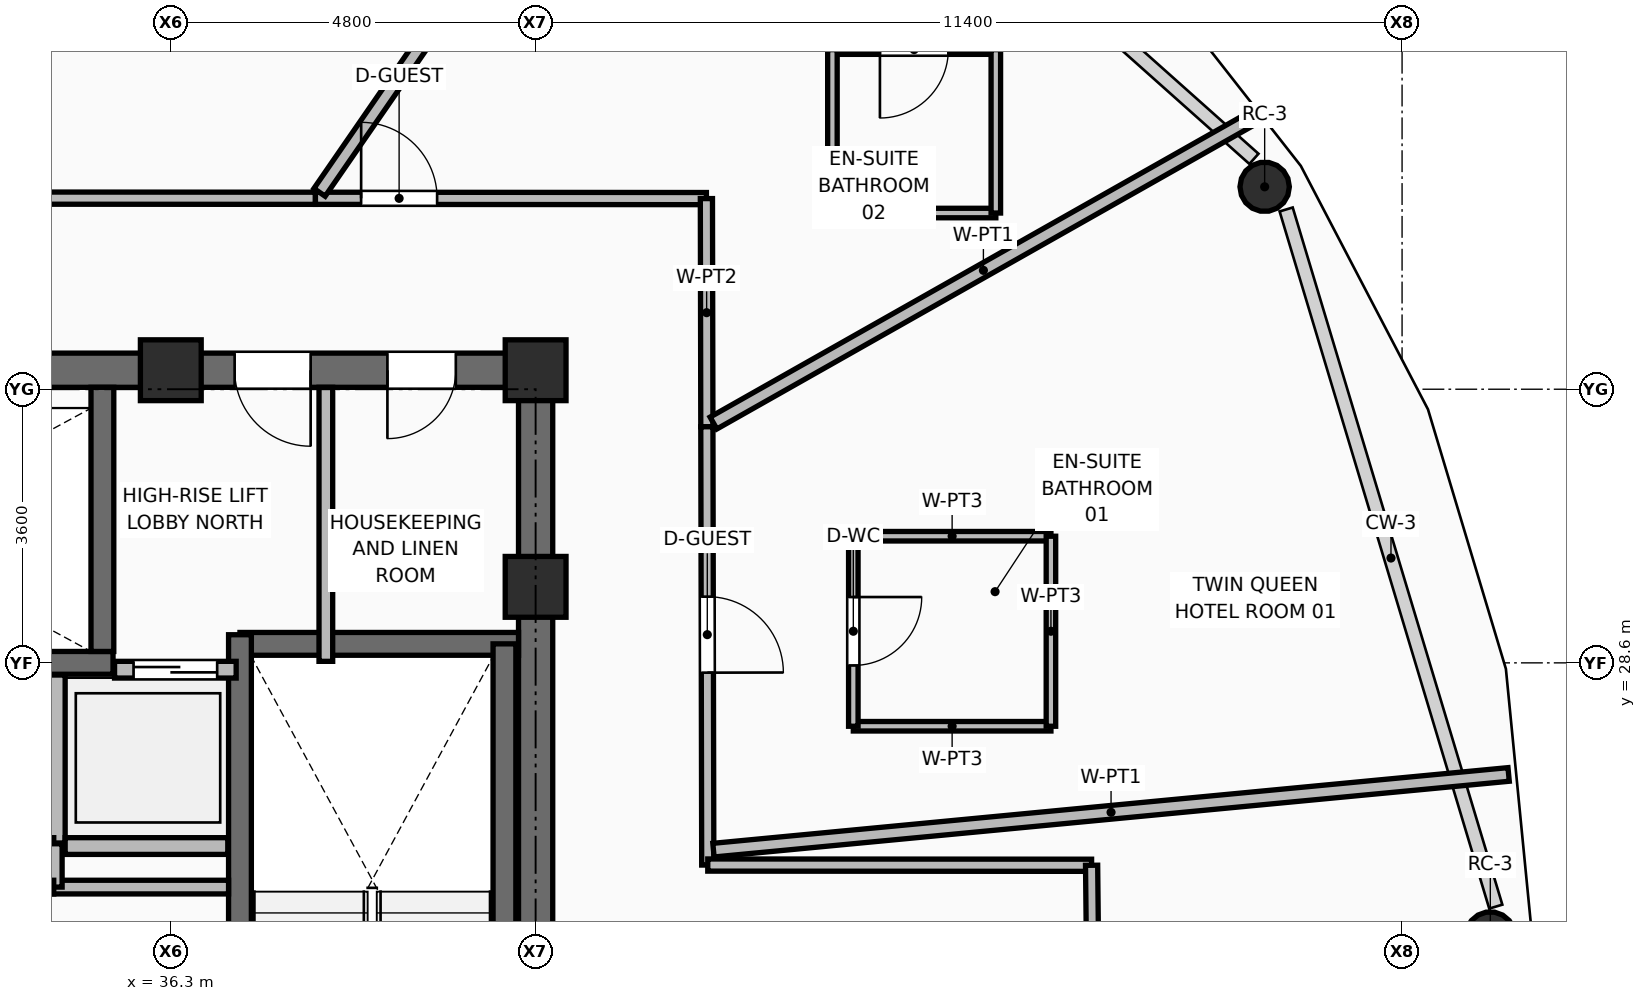
"""IFC4 building model, lengths in metres.
Left out: names, types, materials, properties, quantities, classifications, styles, units other than length and angle.
Written with IfcOpenShell. Run it as: python <this file> out.ifc"""

import sys

from ifc_helpers import new_model, si_unit, direction, frame, frame_2d, origin, origin_2d, place, context, subcontext, project, spatial, rectangle, hollow_circle, extrude, element, fill, save


model = new_model("IFC4")
c1 = context("Model", 3, precision=1e-05, world=origin(), true_north=direction((0.0, 1.0)))
c2 = subcontext(c1, "Body", "Model", "MODEL_VIEW")
j1 = project(units=[si_unit("LENGTHUNIT", "METRE"), si_unit("PLANEANGLEUNIT", "RADIAN")], contexts=[c1])
p1 = place(None, origin())
s1 = spatial("IfcSite", under=j1, at=p1, CompositionType="ELEMENT")
p2 = place(p1, origin())
s2 = spatial("IfcBuilding", under=s1, at=p2, CompositionType="ELEMENT")
p3 = place(p2, frame((0.0, 0.0, 212.4)))
s3 = spatial("IfcBuildingStorey", under=s2, at=p3, CompositionType="ELEMENT", Elevation=212.4)
for number, where, z_axis, x_axis in (
    (1, (41.1, 29.6, 0.0), (0.0, 0.0, 1.0), (1.0, 0.0, 0.0)),
    (2, (36.3, 32.45, 0.0), (0.0, 0.0, 1.0), (1.0, 0.0, 0.0)),
    (3, (41.1, 32.45, 0.0), (0.0, 0.0, 1.0), (1.0, 0.0, 0.0)),
):
    element("IfcColumn", number, at=place(p3, frame(where, z_axis=z_axis, x_axis=x_axis)), inside=s3, PredefinedType="COLUMN", context=c2, shape_type="SweptSolid", body=[
        extrude(rectangle(XDim=0.8, YDim=0.8, at=origin_2d()), origin(), (0.0, 0.0, 1.0), 3.75),
    ])
for number, where, z_axis, x_axis in (
    (4, (53.661, 25.0, 0.0), (-0.021, 0.0, 1.0), (0.0, -1.0, 0.0)),
    (5, (50.692, 34.863, 0.0), (-0.018, -0.009, 1.0), (0.458, -0.889, 0.0)),
):
    element("IfcColumn", number, at=place(p3, frame(where, z_axis=z_axis, x_axis=x_axis)), inside=s3, PredefinedType="COLUMN", context=c2, shape_type="SweptSolid", body=[
        extrude(hollow_circle(Radius=0.325, WallThickness=0.03, at=origin_2d()), origin(), (0.0, 0.0, 1.0), 3.571),
    ])
p4 = place(p3, frame((34.8, 26.23, 0.0), z_axis=(0.0, 0.0, 1.0), x_axis=(0.0, 1.0, 0.0)))
e6 = element("IfcWall", 6, at=p4, inside=s3, PredefinedType="PARTITIONING", context=c2, shape_type="SweptSolid", body=[
    extrude(rectangle(XDim=2.21, YDim=0.22, at=frame_2d((1.105, 0.0))), origin(), (0.0, 0.0, 1.0), 3.545),
])
p5 = place(p3, frame((34.91, 26.19, 0.0), z_axis=(0.0, 0.0, 1.0), x_axis=(1.0, 0.0, 0.0)))
e7 = element("IfcWall", 7, at=p5, inside=s3, PredefinedType="PARTITIONING", context=c2, shape_type="SweptSolid", body=[
    extrude(rectangle(XDim=2.14, YDim=0.22, at=frame_2d((1.07, 0.0))), origin(), (0.0, 0.0, 1.0), 3.545),
])
p6 = place(p3, frame((21.675, 32.45, 0.0), z_axis=(0.0, 0.0, 1.0), x_axis=(1.0, 0.0, 0.0)))
e8 = element("IfcWall", 8, at=p6, inside=s3, PredefinedType="SHEAR", context=c2, shape_type="SweptSolid", body=[
    extrude(rectangle(XDim=19.65, YDim=0.45, at=frame_2d((9.825, 0.0))), origin(), (0.0, 0.0, 1.0), 3.57),
])
p7 = place(p6, frame((2.075, 0.0, 0.0)))
e9 = element("IfcOpeningElement", 9, at=p7, cuts=e8, PredefinedType="OPENING", context=c2, shape_type="SweptSolid", body=[
    extrude(rectangle(XDim=1.1, YDim=2.1, at=frame_2d((0.55, 1.05))), frame((0.0, 0.235, 0.0), z_axis=(0.0, -1.0, 0.0), x_axis=(1.0, 0.0, 0.0)), (0.0, 0.0, 1.0), 0.47),
])
p8 = place(p6, frame((15.465, 0.0, 0.0)))
e10 = element("IfcOpeningElement", 10, at=p8, cuts=e8, PredefinedType="OPENING", context=c2, shape_type="SweptSolid", body=[
    extrude(rectangle(XDim=1.0, YDim=2.1, at=frame_2d((0.5, 1.05))), frame((0.0, 0.235, 0.0), z_axis=(0.0, -1.0, 0.0), x_axis=(1.0, 0.0, 0.0)), (0.0, 0.0, 1.0), 0.47),
])
p9 = place(p6, frame((17.475, 0.0, 0.0)))
e11 = element("IfcOpeningElement", 11, at=p9, cuts=e8, PredefinedType="OPENING", context=c2, shape_type="SweptSolid", body=[
    extrude(rectangle(XDim=0.9, YDim=2.1, at=frame_2d((0.45, 1.05))), frame((0.0, 0.235, 0.0), z_axis=(0.0, -1.0, 0.0), x_axis=(1.0, 0.0, 0.0)), (0.0, 0.0, 1.0), 0.47),
])
p10 = place(p3, frame((41.1, 18.025, 0.0), z_axis=(0.0, 0.0, 1.0), x_axis=(0.0, 1.0, 0.0)))
e12 = element("IfcWall", 12, at=p10, inside=s3, PredefinedType="SHEAR", context=c2, shape_type="SweptSolid", body=[
    extrude(rectangle(XDim=14.2, YDim=0.45, at=frame_2d((7.1, 0.0))), origin(), (0.0, 0.0, 1.0), 3.57),
])
p11 = place(p10, frame((3.435, 0.0, 0.0)))
e13 = element("IfcOpeningElement", 13, at=p11, cuts=e12, PredefinedType="OPENING", context=c2, shape_type="SweptSolid", body=[
    extrude(rectangle(XDim=1.05, YDim=2.1, at=frame_2d((0.525, 1.05))), frame((0.0, 0.235, 0.0), z_axis=(0.0, -1.0, 0.0), x_axis=(1.0, 0.0, 0.0)), (0.0, 0.0, 1.0), 0.47),
])
p12 = place(p3, frame((37.21, 28.85, 0.0), z_axis=(0.0, 0.0, 1.0), x_axis=(1.0, 0.0, 0.0)))
e14 = element("IfcWall", 14, at=p12, inside=s3, PredefinedType="SHEAR", context=c2, shape_type="SweptSolid", body=[
    extrude(rectangle(XDim=3.665, YDim=0.3, at=frame_2d((1.833, 0.0))), origin(), (0.0, 0.0, 1.0), 3.57),
])
p13 = place(p3, frame((37.21, 20.98, 0.0), z_axis=(0.0, 0.0, 1.0), x_axis=(0.0, 1.0, 0.0)))
e15 = element("IfcWall", 15, at=p13, inside=s3, PredefinedType="SHEAR", context=c2, shape_type="SweptSolid", body=[
    extrude(rectangle(XDim=7.99, YDim=0.3, at=frame_2d((3.995, 0.0))), origin(), (0.0, 0.0, 1.0), 3.57),
])
p14 = place(p3, frame((40.69, 22.65, 0.0), z_axis=(0.0, 0.0, 1.0), x_axis=(0.0, 1.0, 0.0)))
e16 = element("IfcWall", 16, at=p14, inside=s3, PredefinedType="SHEAR", context=c2, shape_type="SweptSolid", body=[
    extrude(rectangle(XDim=6.2, YDim=0.3, at=frame_2d((3.1, 0.0))), origin(), (0.0, 0.0, 1.0), 3.57),
])
p15 = place(p3, frame((27.51, 28.6, 0.0), z_axis=(0.0, 0.0, 1.0), x_axis=(1.0, 0.0, 0.0)))
e17 = element("IfcWall", 17, at=p15, inside=s3, PredefinedType="SHEAR", context=c2, shape_type="SweptSolid", body=[
    extrude(rectangle(XDim=8.03, YDim=0.3, at=frame_2d((4.015, 0.0))), origin(), (0.0, 0.0, 1.0), 3.57),
])
p16 = place(p3, frame((35.4, 28.75, 0.0), z_axis=(0.0, 0.0, 1.0), x_axis=(0.0, 1.0, 0.0)))
e18 = element("IfcWall", 18, at=p16, inside=s3, PredefinedType="SHEAR", context=c2, shape_type="SweptSolid", body=[
    extrude(rectangle(XDim=3.475, YDim=0.3, at=frame_2d((1.738, 0.0))), origin(), (0.0, 0.0, 1.0), 3.57),
])
p17 = place(p3, frame((32.44, 26.19, 0.0), z_axis=(0.0, 0.0, 1.0), x_axis=(1.0, 0.0, 0.0)))
e19 = element("IfcWall", 19, at=p17, inside=s3, PredefinedType="PARTITIONING", context=c2, shape_type="SweptSolid", body=[
    extrude(rectangle(XDim=2.32, YDim=0.22, at=frame_2d((1.16, 0.0))), origin(), (0.0, 0.0, 1.0), 3.55),
])
p18 = place(p17, frame((0.61, 0.0, 0.0)))
e20 = element("IfcOpeningElement", 20, at=p18, cuts=e19, PredefinedType="OPENING", context=c2, shape_type="SweptSolid", body=[
    extrude(rectangle(XDim=1.1, YDim=2.2, at=frame_2d((0.55, 1.1))), frame((0.0, 0.12, 0.0), z_axis=(0.0, -1.0, 0.0), x_axis=(1.0, 0.0, 0.0)), (0.0, 0.0, 1.0), 0.24),
])
p19 = place(p3, frame((35.56, 28.51, 0.0), z_axis=(0.0, 0.0, 1.0), x_axis=(1.0, 0.0, 0.0)))
e21 = element("IfcWall", 21, at=p19, inside=s3, PredefinedType="PARTITIONING", context=c2, shape_type="SweptSolid", body=[
    extrude(rectangle(XDim=1.6, YDim=0.22, at=frame_2d((0.8, 0.0))), origin(), (0.0, 0.0, 1.0), 3.55),
])
p20 = place(p19, frame((0.25, 0.0, 0.0)))
e22 = element("IfcOpeningElement", 22, at=p20, cuts=e21, PredefinedType="OPENING", context=c2, shape_type="SweptSolid", body=[
    extrude(rectangle(XDim=1.1, YDim=2.2, at=frame_2d((0.55, 1.1))), frame((0.0, 0.12, 0.0), z_axis=(0.0, -1.0, 0.0), x_axis=(1.0, 0.0, 0.0)), (0.0, 0.0, 1.0), 0.24),
])
p21 = place(p3, frame((34.72, 25.65, 0.0), z_axis=(0.0, 0.0, 1.0), x_axis=(1.0, 0.0, 0.0)))
e23 = element("IfcWall", 23, at=p21, inside=s3, PredefinedType="PARTITIONING", context=c2, shape_type="SweptSolid", body=[
    extrude(rectangle(XDim=2.34, YDim=0.18, at=frame_2d((1.17, 0.0))), origin(), (0.0, 0.0, 1.0), 3.55),
])
p22 = place(p3, frame((34.76, 25.65, 0.0), z_axis=(0.0, 0.0, 1.0), x_axis=(0.0, 1.0, 0.0)))
e24 = element("IfcWall", 24, at=p22, inside=s3, PredefinedType="PARTITIONING", context=c2, shape_type="SweptSolid", body=[
    extrude(rectangle(XDim=0.57, YDim=0.22, at=frame_2d((0.285, 0.0))), origin(), (0.0, 0.0, 1.0), 3.55),
])
p23 = place(p3, frame((33.08, 25.65, 0.0), z_axis=(0.0, 0.0, 1.0), x_axis=(1.0, 0.0, 0.0)))
e25 = element("IfcWall", 25, at=p23, inside=s3, PredefinedType="PARTITIONING", context=c2, shape_type="SweptSolid", body=[
    extrude(rectangle(XDim=1.68, YDim=0.18, at=frame_2d((0.84, 0.0))), origin(), (0.0, 0.0, 1.0), 3.55),
])
p24 = place(p3, frame((38.34, 28.62, 0.0), z_axis=(0.0, 0.0, 1.0), x_axis=(0.0, 1.0, 0.0)))
e26 = element("IfcWall", 26, at=p24, inside=s3, PredefinedType="PARTITIONING", context=c2, shape_type="SweptSolid", body=[
    extrude(rectangle(XDim=3.605, YDim=0.18, at=frame_2d((1.802, 0.0))), origin(), (0.0, 0.0, 1.0), 3.55),
])
p25 = place(p3, frame((32.74, 34.715, 0.0), z_axis=(0.0, 0.0, 1.0), x_axis=(0.999999831231, -0.000580979523, 0.0)))
e27 = element("IfcWall", 27, at=p25, inside=s3, PredefinedType="PARTITIONING", context=c2, shape_type="SweptSolid", body=[
    extrude(rectangle(XDim=5.463, YDim=0.16, at=frame_2d((2.731, 0.0))), origin(), (0.0, 0.0, 1.0), 3.55),
])
p26 = place(p25, frame((0.16, 0.0, 0.0)))
e28 = element("IfcOpeningElement", 28, at=p26, cuts=e27, PredefinedType="OPENING", context=c2, shape_type="SweptSolid", body=[
    extrude(rectangle(XDim=1.0, YDim=2.1, at=frame_2d((0.5, 1.05))), frame((0.0, 0.09, 0.0), z_axis=(0.0, -1.0, 0.0), x_axis=(1.0, 0.0, 0.0)), (0.0, 0.0, 1.0), 0.18),
])
p27 = place(p3, frame((38.203, 34.712, 0.0), z_axis=(0.0, 0.0, 1.0), x_axis=(0.999999711676, -0.000759373298, 0.0)))
e29 = element("IfcWall", 29, at=p27, inside=s3, PredefinedType="PARTITIONING", context=c2, shape_type="SweptSolid", body=[
    extrude(rectangle(XDim=5.144, YDim=0.16, at=frame_2d((2.572, 0.0))), origin(), (0.0, 0.0, 1.0), 3.081),
])
p28 = place(p27, frame((0.601, 0.0, 0.0)))
e30 = element("IfcOpeningElement", 30, at=p28, cuts=e29, PredefinedType="OPENING", context=c2, shape_type="SweptSolid", body=[
    extrude(rectangle(XDim=1.0, YDim=2.1, at=frame_2d((0.5, 1.05))), frame((0.0, 0.09, 0.0), z_axis=(0.0, -1.0, 0.0), x_axis=(1.0, 0.0, 0.0)), (0.0, 0.0, 1.0), 0.18),
])
p29 = place(p3, frame((43.347, 34.708, 0.0), z_axis=(0.0, 0.0, 1.0), x_axis=(0.00203317732, -0.999997933093, 0.0)))
e31 = element("IfcWall", 31, at=p29, inside=s3, PredefinedType="PARTITIONING", context=c2, shape_type="SweptSolid", body=[
    extrude(rectangle(XDim=3.002, YDim=0.16, at=frame_2d((1.501, 0.0))), origin(), (0.0, 0.0, 1.0), 3.081),
])
p30 = place(p3, frame((43.353, 31.706, 0.0), z_axis=(0.0, 0.0, 1.0), x_axis=(0.002074684332, -0.99999784784, 0.0)))
e32 = element("IfcWall", 32, at=p30, inside=s3, PredefinedType="PARTITIONING", context=c2, shape_type="SweptSolid", body=[
    extrude(rectangle(XDim=5.766, YDim=0.16, at=frame_2d((2.883, 0.0))), origin(), (0.0, 0.0, 1.0), 3.55),
])
p31 = place(p30, frame((2.235, 0.0, 0.0)))
e33 = element("IfcOpeningElement", 33, at=p31, cuts=e32, PredefinedType="OPENING", context=c2, shape_type="SweptSolid", body=[
    extrude(rectangle(XDim=1.0, YDim=2.1, at=frame_2d((0.5, 1.05))), frame((0.0, 0.09, 0.0), z_axis=(0.0, -1.0, 0.0), x_axis=(1.0, 0.0, 0.0)), (0.0, 0.0, 1.0), 0.18),
])
p32 = place(p3, frame((43.365, 25.94, 0.0), z_axis=(0.0, 0.0, 1.0), x_axis=(0.999999831724, -0.000580130432, 0.0)))
e34 = element("IfcWall", 34, at=p32, inside=s3, PredefinedType="PARTITIONING", context=c2, shape_type="SweptSolid", body=[
    extrude(rectangle(XDim=5.05, YDim=0.16, at=frame_2d((2.525, 0.0))), origin(), (0.0, 0.0, 1.0), 3.55),
])
p33 = place(p3, frame((48.415, 25.937, 0.0), z_axis=(0.0, 0.0, 1.0), x_axis=(0.010636586698, -0.999943429912, 0.0)))
e35 = element("IfcWall", 35, at=p33, inside=s3, PredefinedType="PARTITIONING", context=c2, shape_type="SweptSolid", body=[
    extrude(rectangle(XDim=2.341, YDim=0.16, at=frame_2d((1.171, 0.0))), origin(), (0.0, 0.0, 1.0), 3.55),
])
p34 = place(p3, frame((43.44, 26.136, 0.0), z_axis=(0.0, 0.0, 1.0), x_axis=(0.995498186765, 0.094780589504, 0.0)))
e36 = element("IfcWall", 36, at=p34, inside=s3, PredefinedType="PARTITIONING", context=c2, shape_type="SweptSolid", body=[
    extrude(rectangle(XDim=10.51, YDim=0.18, at=frame_2d((5.255, 0.0))), origin(), (0.0, 0.0, 1.0), 2.925),
])
p35 = place(p3, frame((43.44, 31.755, 0.0), z_axis=(0.0, 0.0, 1.0), x_axis=(0.870388943292, 0.492364790978, 0.0)))
e37 = element("IfcWall", 37, at=p35, inside=s3, PredefinedType="PARTITIONING", context=c2, shape_type="SweptSolid", body=[
    extrude(rectangle(XDim=8.161, YDim=0.18, at=frame_2d((4.08, 0.0))), origin(), (0.0, 0.0, 1.0), 2.925),
])
p36 = place(p3, frame((38.257, 34.79, 0.0), z_axis=(0.0, 0.0, 1.0), x_axis=(0.568051508393, 0.822993003502, 0.0)))
e38 = element("IfcWall", 38, at=p36, inside=s3, PredefinedType="PARTITIONING", context=c2, shape_type="SweptSolid", body=[
    extrude(rectangle(XDim=8.936, YDim=0.18, at=frame_2d((4.468, 0.0))), origin(), (0.0, 0.0, 1.0), 2.925),
])
for number, where, z_axis, x_axis in (
    (39, (45.28, 27.766, 0.0), (0.0, 0.0, 1.0), (1.0, 0.0, 0.0)),
    (40, (45.28, 30.266, 0.0), (0.0, 0.0, 1.0), (1.0, 0.0, 0.0)),
):
    element("IfcWall", number, at=place(p3, frame(where, z_axis=z_axis, x_axis=x_axis)), inside=s3, PredefinedType="PARTITIONING", context=c2, shape_type="SweptSolid", body=[
        extrude(rectangle(XDim=2.6, YDim=0.125, at=frame_2d((1.3, 0.0))), origin(), (0.0, 0.0, 1.0), 3.55),
    ])
p37 = place(p3, frame((45.28, 27.766, 0.0), z_axis=(0.0, 0.0, 1.0), x_axis=(0.0, 1.0, 0.0)))
e41 = element("IfcWall", 41, at=p37, inside=s3, PredefinedType="PARTITIONING", context=c2, shape_type="SweptSolid", body=[
    extrude(rectangle(XDim=2.5, YDim=0.125, at=frame_2d((1.25, 0.0))), origin(), (0.0, 0.0, 1.0), 3.55),
])
p38 = place(p37, frame((0.8, 0.0, 0.0)))
e42 = element("IfcOpeningElement", 42, at=p38, cuts=e41, PredefinedType="OPENING", context=c2, shape_type="SweptSolid", body=[
    extrude(rectangle(XDim=0.9, YDim=2.1, at=frame_2d((0.45, 1.05))), frame((0.0, 0.073, 0.0), z_axis=(0.0, -1.0, 0.0), x_axis=(1.0, 0.0, 0.0)), (0.0, 0.0, 1.0), 0.145),
])
p39 = place(p3, frame((47.88, 27.766, 0.0), z_axis=(0.0, 0.0, 1.0), x_axis=(0.0, 1.0, 0.0)))
e43 = element("IfcWall", 43, at=p39, inside=s3, PredefinedType="PARTITIONING", context=c2, shape_type="SweptSolid", body=[
    extrude(rectangle(XDim=2.5, YDim=0.125, at=frame_2d((1.25, 0.0))), origin(), (0.0, 0.0, 1.0), 3.55),
])
p40 = place(p3, frame((45.005, 34.518, 0.0), z_axis=(0.0, 0.0, 1.0), x_axis=(1.0, 0.0, 0.0)))
e44 = element("IfcWall", 44, at=p40, inside=s3, PredefinedType="PARTITIONING", context=c2, shape_type="SweptSolid", body=[
    extrude(rectangle(XDim=2.15, YDim=0.125, at=frame_2d((1.075, 0.0))), origin(), (0.0, 0.0, 1.0), 3.55),
])
p41 = place(p3, frame((45.005, 36.668, 0.0), z_axis=(0.0, 0.0, 1.0), x_axis=(1.0, 0.0, 0.0)))
e45 = element("IfcWall", 45, at=p41, inside=s3, PredefinedType="PARTITIONING", context=c2, shape_type="SweptSolid", body=[
    extrude(rectangle(XDim=2.15, YDim=0.125, at=frame_2d((1.075, 0.0))), origin(), (0.0, 0.0, 1.0), 3.55),
])
p42 = place(p41, frame((0.625, 0.0, 0.0)))
e46 = element("IfcOpeningElement", 46, at=p42, cuts=e45, PredefinedType="OPENING", context=c2, shape_type="SweptSolid", body=[
    extrude(rectangle(XDim=0.9, YDim=2.1, at=frame_2d((0.45, 1.05))), frame((0.0, 0.073, 0.0), z_axis=(0.0, -1.0, 0.0), x_axis=(1.0, 0.0, 0.0)), (0.0, 0.0, 1.0), 0.145),
])
for number, where, z_axis, x_axis in (
    (47, (45.005, 34.518, 0.0), (0.0, 0.0, 1.0), (0.0, 1.0, 0.0)),
    (48, (47.155, 34.518, 0.0), (0.0, 0.0, 1.0), (0.0, 1.0, 0.0)),
):
    element("IfcWall", number, at=place(p3, frame(where, z_axis=z_axis, x_axis=x_axis)), inside=s3, PredefinedType="PARTITIONING", context=c2, shape_type="SweptSolid", body=[
        extrude(rectangle(XDim=2.15, YDim=0.125, at=frame_2d((1.075, 0.0))), origin(), (0.0, 0.0, 1.0), 3.55),
    ])
p43 = place(p20, origin())
e49 = element("IfcDoor", 49, at=p43, inside=s3, OperationType="DOUBLE_DOOR_SLIDING", PredefinedType="DOOR", context=c2, shape_type="SweptSolid", body=[
    extrude(rectangle(XDim=1.1, YDim=2.2, at=frame_2d((0.55, 1.1))), frame((0.0, 0.025, 0.0), z_axis=(0.0, -1.0, 0.0), x_axis=(1.0, 0.0, 0.0)), (0.0, 0.0, 1.0), 0.05),
])
fill(e22, e49)
p44 = place(p8, frame((1.0, 0.0, 0.0), z_axis=(0.0, 0.0, 1.0), x_axis=(-1.0, 0.0, 0.0)))
e50 = element("IfcDoor", 50, at=p44, inside=s3, OperationType="SINGLE_SWING_LEFT", PredefinedType="DOOR", context=c2, shape_type="SweptSolid", body=[
    extrude(rectangle(XDim=1.0, YDim=2.1, at=frame_2d((0.5, 1.05))), frame((0.0, 0.025, 0.0), z_axis=(0.0, -1.0, 0.0), x_axis=(1.0, 0.0, 0.0)), (0.0, 0.0, 1.0), 0.05),
])
fill(e10, e50)
p45 = place(p9, frame((0.9, 0.0, 0.0), z_axis=(0.0, 0.0, 1.0), x_axis=(-1.0, 0.0, 0.0)))
e51 = element("IfcDoor", 51, at=p45, inside=s3, OperationType="SINGLE_SWING_RIGHT", PredefinedType="DOOR", context=c2, shape_type="SweptSolid", body=[
    extrude(rectangle(XDim=0.9, YDim=2.1, at=frame_2d((0.45, 1.05))), frame((0.0, 0.025, 0.0), z_axis=(0.0, -1.0, 0.0), x_axis=(1.0, 0.0, 0.0)), (0.0, 0.0, 1.0), 0.05),
])
fill(e11, e51)
p46 = place(p38, frame((0.9, 0.0, 0.0), z_axis=(0.0, 0.0, 1.0), x_axis=(-1.0, 0.0, 0.0)))
e52 = element("IfcDoor", 52, at=p46, inside=s3, OperationType="SINGLE_SWING_LEFT", PredefinedType="DOOR", context=c2, shape_type="SweptSolid", body=[
    extrude(rectangle(XDim=0.9, YDim=2.1, at=frame_2d((0.45, 1.05))), frame((0.0, 0.025, 0.0), z_axis=(0.0, -1.0, 0.0), x_axis=(1.0, 0.0, 0.0)), (0.0, 0.0, 1.0), 0.05),
])
fill(e42, e52)
p47 = place(p31, origin())
e53 = element("IfcDoor", 53, at=p47, inside=s3, OperationType="SINGLE_SWING_RIGHT", PredefinedType="DOOR", context=c2, shape_type="SweptSolid", body=[
    extrude(rectangle(XDim=1.0, YDim=2.1, at=frame_2d((0.5, 1.05))), frame((0.0, 0.025, 0.0), z_axis=(0.0, -1.0, 0.0), x_axis=(1.0, 0.0, 0.0)), (0.0, 0.0, 1.0), 0.05),
])
fill(e33, e53)
p48 = place(p28, origin())
e54 = element("IfcDoor", 54, at=p48, inside=s3, OperationType="SINGLE_SWING_LEFT", PredefinedType="DOOR", context=c2, shape_type="SweptSolid", body=[
    extrude(rectangle(XDim=1.0, YDim=2.1, at=frame_2d((0.5, 1.05))), frame((0.0, 0.025, 0.0), z_axis=(0.0, -1.0, 0.0), x_axis=(1.0, 0.0, 0.0)), (0.0, 0.0, 1.0), 0.05),
])
fill(e30, e54)
save(model, sys.argv[1])
